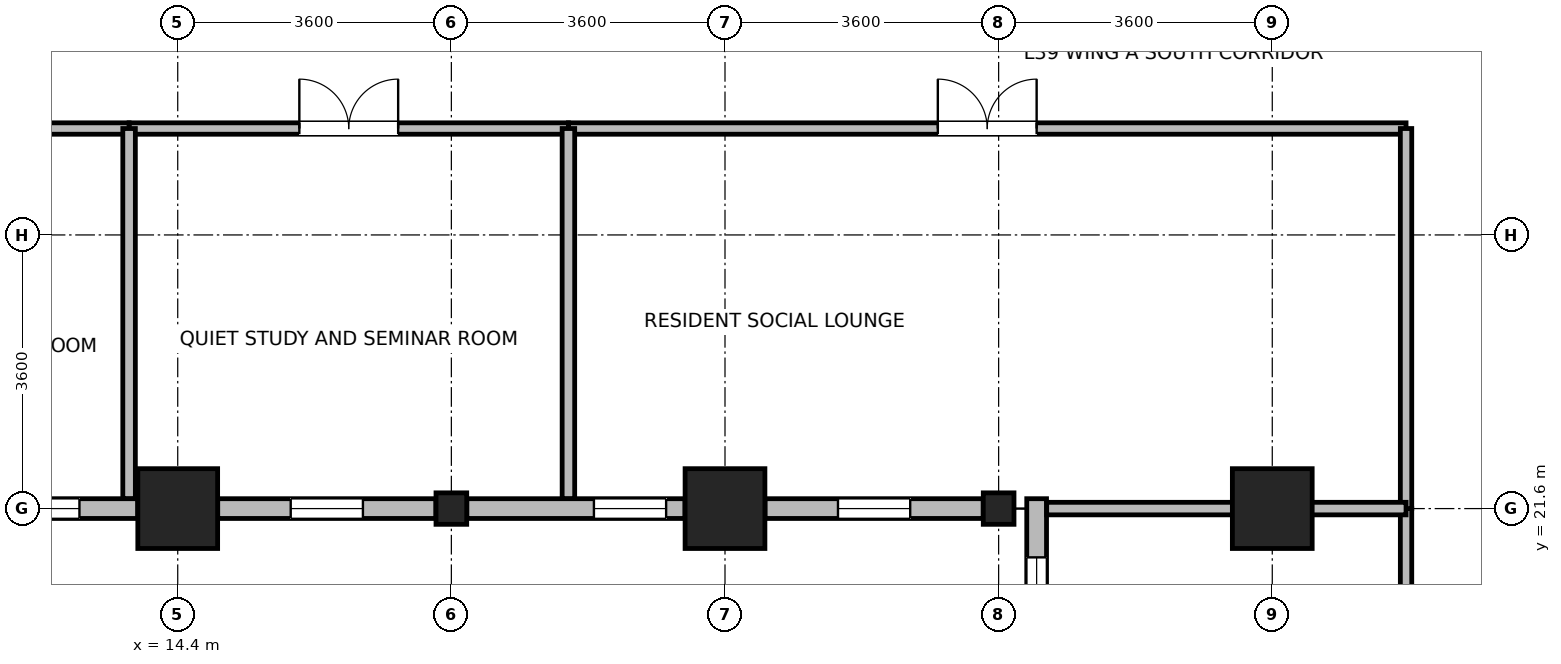
"""IFC4 building model, lengths in metres.
Left out: names, types, materials, properties, quantities, classifications, styles, units other than length and angle.
Written with IfcOpenShell. Run it as: python <this file> out.ifc"""

import sys

from ifc_helpers import new_model, si_unit, direction, frame, frame_2d, origin, origin_2d, place, context, subcontext, project, spatial, rectangle, i_section, extrude, source, transform, mapped, element, fill, save


model = new_model("IFC4")
c1 = context("Model", 3, precision=1e-05, world=origin(), true_north=direction((0.0, 1.0)))
c2 = subcontext(c1, "Body", "Model", "MODEL_VIEW")
j1 = project(units=[si_unit("LENGTHUNIT", "METRE"), si_unit("PLANEANGLEUNIT", "RADIAN")], contexts=[c1])
p1 = place(None, origin())
s1 = spatial("IfcSite", under=j1, at=p1, CompositionType="ELEMENT")
p2 = place(p1, origin())
s2 = spatial("IfcBuilding", under=s1, at=p2, CompositionType="ELEMENT")
p3 = place(p2, frame((0.0, 0.0, 155.0)))
s3 = spatial("IfcBuildingStorey", under=s2, at=p3, CompositionType="ELEMENT", Elevation=155.0)
m1 = source(origin(), c2, "Body", "SweptSolid", [
    extrude(rectangle(XDim=1.05, YDim=1.05, at=origin_2d()), origin(), (0.0, 0.0, 1.0), 3.7),
])
for number, where, z_axis, x_axis in (
    (1, (14.4, 21.6, 0.0), (0.0, 0.0, 1.0), (1.0, 0.0, 0.0)),
    (2, (21.6, 21.6, 0.0), (0.0, 0.0, 1.0), (1.0, 0.0, 0.0)),
    (3, (28.8, 21.6, 0.0), (0.0, 0.0, 1.0), (1.0, 0.0, 0.0)),
):
    element("IfcColumn", number, at=place(p3, frame(where, z_axis=z_axis, x_axis=x_axis)), inside=s3, PredefinedType="COLUMN", context=c2, shape_type="MappedRepresentation", body=[
        mapped(m1, transform((0.0, 0.0, 0.0), x_axis=(1.0, 0.0, 0.0), y_axis=(0.0, 1.0, 0.0), z_axis=(0.0, 0.0, 1.0), scale=1.0)),
    ])
m2 = source(origin(), c2, "Body", "SweptSolid", [
    extrude(i_section(OverallWidth=0.404, OverallDepth=0.414, WebThickness=0.021, FlangeThickness=0.028, FilletRadius=0.015, at=origin_2d()), origin(), (0.0, 0.0, 1.0), 3.7),
])
for number, where, z_axis, x_axis in (
    (4, (18.0, 21.6, 0.0), (0.0, 0.0, 1.0), (1.0, 0.0, 0.0)),
    (5, (25.2, 21.6, 0.0), (0.0, 0.0, 1.0), (1.0, 0.0, 0.0)),
):
    element("IfcColumn", number, at=place(p3, frame(where, z_axis=z_axis, x_axis=x_axis)), inside=s3, PredefinedType="COLUMN", context=c2, shape_type="MappedRepresentation", body=[
        mapped(m2, transform((0.0, 0.0, 0.0), x_axis=(1.0, 0.0, 0.0), y_axis=(0.0, 1.0, 0.0), z_axis=(0.0, 0.0, 1.0), scale=1.0)),
    ])
p4 = place(p3, frame((13.874, 21.6, 0.0), z_axis=(0.0, 0.0, 1.0), x_axis=(-1.0, 0.0, 0.0)))
e6 = element("IfcWall", 6, at=p4, inside=s3, PredefinedType="STANDARD", context=c2, shape_type="SweptSolid", body=[
    extrude(rectangle(XDim=13.337, YDim=0.26, at=frame_2d((6.668, 0.0))), origin(), (0.0, 0.0, 1.0), 3.44),
])
p5 = place(p4, frame((0.767, 0.0, 0.85)))
e7 = element("IfcOpeningElement", 7, at=p5, cuts=e6, PredefinedType="OPENING", context=c2, shape_type="SweptSolid", body=[
    extrude(rectangle(XDim=1.8, YDim=1.85, at=frame_2d((0.9, 0.925))), frame((0.0, 0.14, 0.0), z_axis=(0.0, -1.0, 0.0), x_axis=(1.0, 0.0, 0.0)), (0.0, 0.0, 1.0), 0.28),
])
p6 = place(p4, frame((10.77, 0.0, 0.85)))
e8 = element("IfcOpeningElement", 8, at=p6, cuts=e6, PredefinedType="OPENING", context=c2, shape_type="SweptSolid", body=[
    extrude(rectangle(XDim=1.8, YDim=1.85, at=frame_2d((0.9, 0.925))), frame((0.0, 0.14, 0.0), z_axis=(0.0, -1.0, 0.0), x_axis=(1.0, 0.0, 0.0)), (0.0, 0.0, 1.0), 0.28),
])
p7 = place(p3, frame((17.797, 21.6, 0.0), z_axis=(0.0, 0.0, 1.0), x_axis=(-1.0, 0.0, 0.0)))
e9 = element("IfcWall", 9, at=p7, inside=s3, PredefinedType="STANDARD", context=c2, shape_type="SweptSolid", body=[
    extrude(rectangle(XDim=2.871, YDim=0.26, at=frame_2d((1.436, 0.0))), origin(), (0.0, 0.0, 1.0), 2.99),
])
p8 = place(p7, frame((0.96, 0.0, 0.85)))
e10 = element("IfcOpeningElement", 10, at=p8, cuts=e9, PredefinedType="OPENING", context=c2, shape_type="SweptSolid", body=[
    extrude(rectangle(XDim=0.95, YDim=1.75, at=frame_2d((0.475, 0.875))), frame((0.0, 0.14, 0.0), z_axis=(0.0, -1.0, 0.0), x_axis=(1.0, 0.0, 0.0)), (0.0, 0.0, 1.0), 0.28),
])
p9 = place(p3, frame((21.074, 21.6, 0.0), z_axis=(0.0, 0.0, 1.0), x_axis=(-1.0, 0.0, 0.0)))
e11 = element("IfcWall", 11, at=p9, inside=s3, PredefinedType="STANDARD", context=c2, shape_type="SweptSolid", body=[
    extrude(rectangle(XDim=2.871, YDim=0.26, at=frame_2d((1.436, 0.0))), origin(), (0.0, 0.0, 1.0), 2.99),
])
p10 = place(p9, frame((0.249, 0.0, 0.85)))
e12 = element("IfcOpeningElement", 12, at=p10, cuts=e11, PredefinedType="OPENING", context=c2, shape_type="SweptSolid", body=[
    extrude(rectangle(XDim=0.95, YDim=1.75, at=frame_2d((0.475, 0.875))), frame((0.0, 0.14, 0.0), z_axis=(0.0, -1.0, 0.0), x_axis=(1.0, 0.0, 0.0)), (0.0, 0.0, 1.0), 0.28),
])
p11 = place(p3, frame((24.997, 21.6, 0.0), z_axis=(0.0, 0.0, 1.0), x_axis=(-1.0, 0.0, 0.0)))
e13 = element("IfcWall", 13, at=p11, inside=s3, PredefinedType="STANDARD", context=c2, shape_type="SweptSolid", body=[
    extrude(rectangle(XDim=2.871, YDim=0.26, at=frame_2d((1.436, 0.0))), origin(), (0.0, 0.0, 1.0), 2.99),
])
p12 = place(p11, frame((0.96, 0.0, 0.85)))
e14 = element("IfcOpeningElement", 14, at=p12, cuts=e13, PredefinedType="OPENING", context=c2, shape_type="SweptSolid", body=[
    extrude(rectangle(XDim=0.95, YDim=1.75, at=frame_2d((0.475, 0.875))), frame((0.0, 0.14, 0.0), z_axis=(0.0, -1.0, 0.0), x_axis=(1.0, 0.0, 0.0)), (0.0, 0.0, 1.0), 0.28),
])
p13 = place(p3, frame((25.7, 1.67, 0.0), z_axis=(0.0, 0.0, 1.0), x_axis=(0.0, 1.0, 0.0)))
e15 = element("IfcWall", 15, at=p13, inside=s3, PredefinedType="STANDARD", context=c2, shape_type="SweptSolid", body=[
    extrude(rectangle(XDim=20.06, YDim=0.26, at=frame_2d((10.03, 0.0))), origin(), (0.0, 0.0, 1.0), 3.44),
])
p14 = place(p13, frame((0.772, 0.0, 0.85)))
e16 = element("IfcOpeningElement", 16, at=p14, cuts=e15, PredefinedType="OPENING", context=c2, shape_type="SweptSolid", body=[
    extrude(rectangle(XDim=1.8, YDim=1.85, at=frame_2d((0.9, 0.925))), frame((0.0, 0.14, 0.0), z_axis=(0.0, -1.0, 0.0), x_axis=(1.0, 0.0, 0.0)), (0.0, 0.0, 1.0), 0.28),
])
p15 = place(p13, frame((7.458, 0.0, 0.85)))
e17 = element("IfcOpeningElement", 17, at=p15, cuts=e15, PredefinedType="OPENING", context=c2, shape_type="SweptSolid", body=[
    extrude(rectangle(XDim=1.8, YDim=1.85, at=frame_2d((0.9, 0.925))), frame((0.0, 0.14, 0.0), z_axis=(0.0, -1.0, 0.0), x_axis=(1.0, 0.0, 0.0)), (0.0, 0.0, 1.0), 0.28),
])
p16 = place(p13, frame((14.145, 0.0, 0.85)))
e18 = element("IfcOpeningElement", 18, at=p16, cuts=e15, PredefinedType="OPENING", context=c2, shape_type="SweptSolid", body=[
    extrude(rectangle(XDim=1.8, YDim=1.85, at=frame_2d((0.9, 0.925))), frame((0.0, 0.14, 0.0), z_axis=(0.0, -1.0, 0.0), x_axis=(1.0, 0.0, 0.0)), (0.0, 0.0, 1.0), 0.28),
])
p17 = place(p13, frame((17.488, 0.0, 0.85)))
e19 = element("IfcOpeningElement", 19, at=p17, cuts=e15, PredefinedType="OPENING", context=c2, shape_type="SweptSolid", body=[
    extrude(rectangle(XDim=1.8, YDim=1.85, at=frame_2d((0.9, 0.925))), frame((0.0, 0.14, 0.0), z_axis=(0.0, -1.0, 0.0), x_axis=(1.0, 0.0, 0.0)), (0.0, 0.0, 1.0), 0.28),
])
p18 = place(p3, frame((19.54, 26.6, 0.0), z_axis=(0.0, 0.0, 1.0), x_axis=(1.0, 0.0, 0.0)))
e20 = element("IfcWall", 20, at=p18, inside=s3, PredefinedType="PARTITIONING", context=c2, shape_type="SweptSolid", body=[
    extrude(rectangle(XDim=11.02, YDim=0.15, at=frame_2d((5.51, 0.0))), origin(), (0.0, 0.0, 1.0), 3.44),
])
p19 = place(p18, frame((4.86, 0.0, 0.0)))
e21 = element("IfcOpeningElement", 21, at=p19, cuts=e20, PredefinedType="OPENING", context=c2, shape_type="SweptSolid", body=[
    extrude(rectangle(XDim=1.3, YDim=2.12, at=frame_2d((0.65, 1.06))), frame((0.0, 0.085, 0.0), z_axis=(0.0, -1.0, 0.0), x_axis=(1.0, 0.0, 0.0)), (0.0, 0.0, 1.0), 0.17),
])
p20 = place(p3, frame((30.56, 14.5, 0.0), z_axis=(0.0, 0.0, 1.0), x_axis=(0.0, 1.0, 0.0)))
e22 = element("IfcWall", 22, at=p20, inside=s3, PredefinedType="PARTITIONING", context=c2, shape_type="SweptSolid", body=[
    extrude(rectangle(XDim=7.1, YDim=0.15, at=frame_2d((3.55, 0.0))), origin(), (0.0, 0.0, 1.0), 3.44),
])
p21 = place(p20, frame((2.9, 0.0, 0.0)))
e23 = element("IfcOpeningElement", 23, at=p21, cuts=e22, PredefinedType="OPENING", context=c2, shape_type="SweptSolid", body=[
    extrude(rectangle(XDim=1.3, YDim=2.12, at=frame_2d((0.65, 1.06))), frame((0.0, 0.085, 0.0), z_axis=(0.0, -1.0, 0.0), x_axis=(1.0, 0.0, 0.0)), (0.0, 0.0, 1.0), 0.17),
])
p22 = place(p3, frame((13.76, 26.6, 0.0), z_axis=(0.0, 0.0, 1.0), x_axis=(1.0, 0.0, 0.0)))
e24 = element("IfcWall", 24, at=p22, inside=s3, PredefinedType="PARTITIONING", context=c2, shape_type="SweptSolid", body=[
    extrude(rectangle(XDim=5.78, YDim=0.15, at=frame_2d((2.89, 0.0))), origin(), (0.0, 0.0, 1.0), 3.44),
])
p23 = place(p22, frame((2.24, 0.0, 0.0)))
e25 = element("IfcOpeningElement", 25, at=p23, cuts=e24, PredefinedType="OPENING", context=c2, shape_type="SweptSolid", body=[
    extrude(rectangle(XDim=1.3, YDim=2.12, at=frame_2d((0.65, 1.06))), frame((0.0, 0.085, 0.0), z_axis=(0.0, -1.0, 0.0), x_axis=(1.0, 0.0, 0.0)), (0.0, 0.0, 1.0), 0.17),
])
p24 = place(p3, frame((30.56, 21.6, 0.0), z_axis=(0.0, 0.0, 1.0), x_axis=(0.0, 1.0, 0.0)))
e26 = element("IfcWall", 26, at=p24, inside=s3, PredefinedType="PARTITIONING", context=c2, shape_type="SweptSolid", body=[
    extrude(rectangle(XDim=5.0, YDim=0.15, at=frame_2d((2.5, 0.0))), origin(), (0.0, 0.0, 1.0), 3.44),
])
p25 = place(p3, frame((9.08, 26.6, 0.0), z_axis=(0.0, 0.0, 1.0), x_axis=(1.0, 0.0, 0.0)))
e27 = element("IfcWall", 27, at=p25, inside=s3, PredefinedType="PARTITIONING", context=c2, shape_type="SweptSolid", body=[
    extrude(rectangle(XDim=4.68, YDim=0.15, at=frame_2d((2.34, 0.0))), origin(), (0.0, 0.0, 1.0), 3.44),
])
p26 = place(p25, frame((1.865, 0.0, 0.0)))
e28 = element("IfcOpeningElement", 28, at=p26, cuts=e27, PredefinedType="OPENING", context=c2, shape_type="SweptSolid", body=[
    extrude(rectangle(XDim=0.95, YDim=2.1, at=frame_2d((0.475, 1.05))), frame((0.0, 0.085, 0.0), z_axis=(0.0, -1.0, 0.0), x_axis=(1.0, 0.0, 0.0)), (0.0, 0.0, 1.0), 0.17),
])
for number, where, z_axis, x_axis in (
    (29, (13.76, 21.732, 0.0), (0.0, 0.0, 1.0), (0.0, 1.0, 0.0)),
    (30, (19.54, 21.732, 0.0), (0.0, 0.0, 1.0), (0.0, 1.0, 0.0)),
):
    element("IfcWall", number, at=place(p3, frame(where, z_axis=z_axis, x_axis=x_axis)), inside=s3, PredefinedType="PARTITIONING", context=c2, shape_type="SweptSolid", body=[
        extrude(rectangle(XDim=4.868, YDim=0.165, at=frame_2d((2.434, 0.0))), origin(), (0.0, 0.0, 1.0), 3.44),
    ])
p27 = place(p3, frame((25.832, 21.6, 0.0), z_axis=(0.0, 0.0, 1.0), x_axis=(1.0, 0.0, 0.0)))
e31 = element("IfcWall", 31, at=p27, inside=s3, PredefinedType="PARTITIONING", context=c2, shape_type="SweptSolid", body=[
    extrude(rectangle(XDim=4.728, YDim=0.165, at=frame_2d((2.364, 0.0))), origin(), (0.0, 0.0, 1.0), 2.99),
])
p28 = place(p5, origin())
e32 = element("IfcWindow", 32, at=p28, inside=s3, PartitioningType="SINGLE_PANEL", PredefinedType="WINDOW", context=c2, shape_type="SweptSolid", body=[
    extrude(rectangle(XDim=1.8, YDim=1.85, at=frame_2d((0.9, 0.925))), frame((0.0, 0.03, 0.0), z_axis=(0.0, -1.0, 0.0), x_axis=(1.0, 0.0, 0.0)), (0.0, 0.0, 1.0), 0.06),
])
fill(e7, e32)
p29 = place(p8, origin())
e33 = element("IfcWindow", 33, at=p29, inside=s3, PartitioningType="SINGLE_PANEL", PredefinedType="WINDOW", context=c2, shape_type="SweptSolid", body=[
    extrude(rectangle(XDim=0.95, YDim=1.75, at=frame_2d((0.475, 0.875))), frame((0.0, 0.03, 0.0), z_axis=(0.0, -1.0, 0.0), x_axis=(1.0, 0.0, 0.0)), (0.0, 0.0, 1.0), 0.06),
])
fill(e10, e33)
p30 = place(p10, origin())
e34 = element("IfcWindow", 34, at=p30, inside=s3, PartitioningType="SINGLE_PANEL", PredefinedType="WINDOW", context=c2, shape_type="SweptSolid", body=[
    extrude(rectangle(XDim=0.95, YDim=1.75, at=frame_2d((0.475, 0.875))), frame((0.0, 0.03, 0.0), z_axis=(0.0, -1.0, 0.0), x_axis=(1.0, 0.0, 0.0)), (0.0, 0.0, 1.0), 0.06),
])
fill(e12, e34)
p31 = place(p12, origin())
e35 = element("IfcWindow", 35, at=p31, inside=s3, PartitioningType="SINGLE_PANEL", PredefinedType="WINDOW", context=c2, shape_type="SweptSolid", body=[
    extrude(rectangle(XDim=0.95, YDim=1.75, at=frame_2d((0.475, 0.875))), frame((0.0, 0.03, 0.0), z_axis=(0.0, -1.0, 0.0), x_axis=(1.0, 0.0, 0.0)), (0.0, 0.0, 1.0), 0.06),
])
fill(e14, e35)
p32 = place(p17, origin())
e36 = element("IfcWindow", 36, at=p32, inside=s3, PartitioningType="SINGLE_PANEL", PredefinedType="WINDOW", context=c2, shape_type="SweptSolid", body=[
    extrude(rectangle(XDim=1.8, YDim=1.85, at=frame_2d((0.9, 0.925))), frame((0.0, 0.03, 0.0), z_axis=(0.0, -1.0, 0.0), x_axis=(1.0, 0.0, 0.0)), (0.0, 0.0, 1.0), 0.06),
])
fill(e19, e36)
p33 = place(p19, origin())
e37 = element("IfcDoor", 37, at=p33, inside=s3, OperationType="DOUBLE_DOOR_SINGLE_SWING", PredefinedType="DOOR", context=c2, shape_type="SweptSolid", body=[
    extrude(rectangle(XDim=1.3, YDim=2.12, at=frame_2d((0.65, 1.06))), frame((0.0, 0.025, 0.0), z_axis=(0.0, -1.0, 0.0), x_axis=(1.0, 0.0, 0.0)), (0.0, 0.0, 1.0), 0.05),
])
fill(e21, e37)
p34 = place(p23, origin())
e38 = element("IfcDoor", 38, at=p34, inside=s3, OperationType="DOUBLE_DOOR_SINGLE_SWING", PredefinedType="DOOR", context=c2, shape_type="SweptSolid", body=[
    extrude(rectangle(XDim=1.3, YDim=2.12, at=frame_2d((0.65, 1.06))), frame((0.0, 0.025, 0.0), z_axis=(0.0, -1.0, 0.0), x_axis=(1.0, 0.0, 0.0)), (0.0, 0.0, 1.0), 0.05),
])
fill(e25, e38)
save(model, sys.argv[1])
